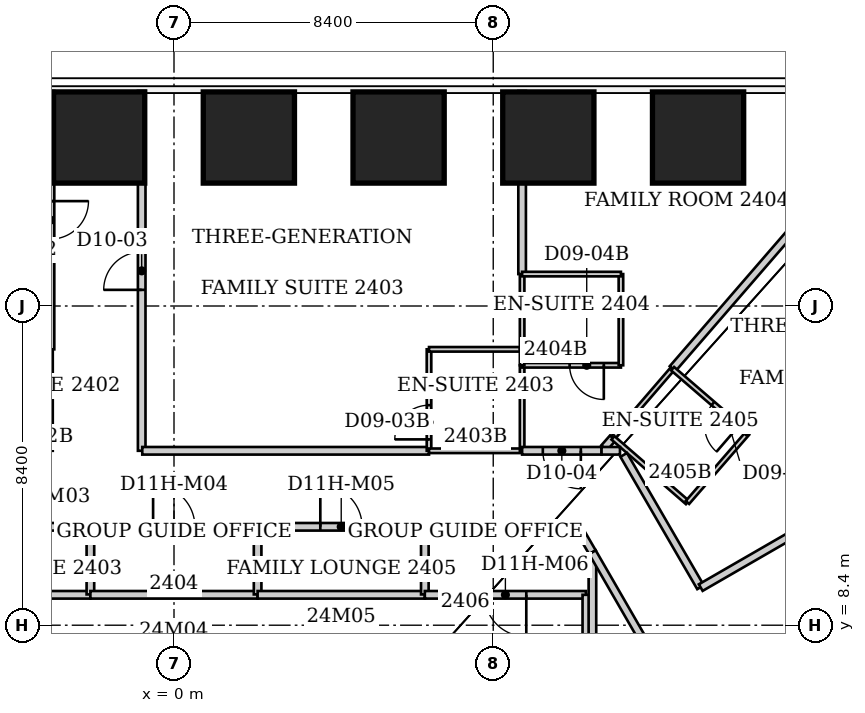
"""IFC4 building model, lengths in metres.
Left out: names, types, materials, properties, quantities, classifications, styles, units other than length and angle.
Written with IfcOpenShell. Run it as: python <this file> out.ifc"""

import sys

from ifc_helpers import new_model, si_unit, direction, frame, frame_2d, origin, origin_2d, place, context, subcontext, project, spatial, rectangle, extrude, element, fill, save


model = new_model("IFC4")
c1 = context("Model", 3, precision=1e-05, world=origin(), true_north=direction((0.0, 1.0)))
c2 = subcontext(c1, "Body", "Model", "MODEL_VIEW")
j1 = project(units=[si_unit("LENGTHUNIT", "METRE"), si_unit("PLANEANGLEUNIT", "RADIAN")], contexts=[c1])
p1 = place(None, origin())
s1 = spatial("IfcSite", under=j1, at=p1, CompositionType="ELEMENT")
p2 = place(p1, origin())
s2 = spatial("IfcBuilding", under=s1, at=p2, CompositionType="ELEMENT")
p3 = place(p2, frame((0.0, 0.0, 100.6)))
s3 = spatial("IfcBuildingStorey", under=s2, at=p3, CompositionType="ELEMENT", Elevation=100.6)
for number, where, z_axis, x_axis in (
    (1, (-1.97, 21.234, 0.0), (0.0, 0.0, 1.0), (0.0, 1.0, 0.0)),
    (2, (1.97, 21.234, 0.0), (0.0, 0.0, 1.0), (0.0, 1.0, 0.0)),
    (3, (5.91, 21.234, 0.0), (0.0, 0.0, 1.0), (0.0, 1.0, 0.0)),
    (4, (9.85, 21.234, 0.0), (0.0, 0.0, 1.0), (0.0, 1.0, 0.0)),
    (5, (13.79, 21.234, 0.0), (0.0, 0.0, 1.0), (0.0, 1.0, 0.0)),
):
    element("IfcColumn", number, at=place(p3, frame(where, z_axis=z_axis, x_axis=x_axis)), inside=s3, PredefinedType="COLUMN", context=c2, shape_type="SweptSolid", body=[
        extrude(rectangle(XDim=2.4, YDim=2.4, at=origin_2d()), origin(), (0.0, 0.0, 1.0), 3.8),
    ])
p4 = place(p3, frame((-6.6, 10.99, 0.0), z_axis=(0.0, 0.0, 1.0), x_axis=(1.0, 0.0, 0.0)))
e6 = element("IfcWall", 6, at=p4, inside=s3, PredefinedType="PARTITIONING", context=c2, shape_type="SweptSolid", body=[
    extrude(rectangle(XDim=4.4, YDim=0.2, at=frame_2d((2.2, 0.0))), origin(), (0.0, 0.0, 1.0), 3.64),
])
p5 = place(p4, frame((1.65, 0.0, 0.0)))
e7 = element("IfcOpeningElement", 7, at=p5, cuts=e6, PredefinedType="OPENING", context=c2, shape_type="SweptSolid", body=[
    extrude(rectangle(XDim=1.1, YDim=2.2, at=frame_2d((0.55, 1.1))), frame((0.0, 0.1, 0.0), z_axis=(0.0, -1.0, 0.0), x_axis=(1.0, 0.0, 0.0)), (0.0, 0.0, 1.0), 0.2),
])
p6 = place(p3, frame((-3.25, 15.66, 0.0), z_axis=(0.0, 0.0, 1.0), x_axis=(0.0, -1.0, 0.0)))
e8 = element("IfcWall", 8, at=p6, inside=s3, PredefinedType="PARTITIONING", context=c2, shape_type="SweptSolid", body=[
    extrude(rectangle(XDim=2.67, YDim=0.12, at=frame_2d((1.335, 0.0))), origin(), (0.0, 0.0, 1.0), 3.64),
])
p7 = place(p3, frame((-3.25, 22.46, 0.0), z_axis=(0.0, 0.0, 1.0), x_axis=(0.0, -1.0, 0.0)))
e9 = element("IfcWall", 9, at=p7, inside=s3, PredefinedType="PARTITIONING", context=c2, shape_type="SweptSolid", body=[
    extrude(rectangle(XDim=6.8, YDim=0.2, at=frame_2d((3.4, 0.0))), origin(), (0.0, 0.0, 1.0), 3.64),
])
p8 = place(p7, frame((2.9, 0.0, 0.0)))
e10 = element("IfcOpeningElement", 10, at=p8, cuts=e9, PredefinedType="OPENING", context=c2, shape_type="SweptSolid", body=[
    extrude(rectangle(XDim=1.0, YDim=2.13, at=frame_2d((0.5, 1.065))), frame((0.0, 0.1, 0.0), z_axis=(0.0, -1.0, 0.0), x_axis=(1.0, 0.0, 0.0)), (0.0, 0.0, 1.0), 0.2),
])
p9 = place(p3, frame((-2.2, 9.2, 0.0), z_axis=(0.0, 0.0, 1.0), x_axis=(-1.0, 0.0, 0.0)))
e11 = element("IfcWall", 11, at=p9, inside=s3, PredefinedType="PARTITIONING", context=c2, shape_type="SweptSolid", body=[
    extrude(rectangle(XDim=4.4, YDim=0.2, at=frame_2d((2.2, 0.0))), origin(), (0.0, 0.0, 1.0), 3.64),
])
p10 = place(p3, frame((-2.2, 10.98, 0.0), z_axis=(0.0, 0.0, 1.0), x_axis=(0.0, -1.0, 0.0)))
e12 = element("IfcWall", 12, at=p10, inside=s3, PredefinedType="PARTITIONING", context=c2, shape_type="SweptSolid", body=[
    extrude(rectangle(XDim=1.77, YDim=0.2, at=frame_2d((0.885, 0.0))), origin(), (0.0, 0.0, 1.0), 3.64),
])
p11 = place(p3, frame((-2.2, 10.99, 0.0), z_axis=(0.0, 0.0, 1.0), x_axis=(1.0, 0.0, 0.0)))
e13 = element("IfcWall", 13, at=p11, inside=s3, PredefinedType="PARTITIONING", context=c2, shape_type="SweptSolid", body=[
    extrude(rectangle(XDim=4.4, YDim=0.2, at=frame_2d((2.2, 0.0))), origin(), (0.0, 0.0, 1.0), 3.64),
])
p12 = place(p11, frame((1.65, 0.0, 0.0)))
e14 = element("IfcOpeningElement", 14, at=p12, cuts=e13, PredefinedType="OPENING", context=c2, shape_type="SweptSolid", body=[
    extrude(rectangle(XDim=1.1, YDim=2.2, at=frame_2d((0.55, 1.1))), frame((0.0, 0.1, 0.0), z_axis=(0.0, -1.0, 0.0), x_axis=(1.0, 0.0, 0.0)), (0.0, 0.0, 1.0), 0.2),
])
p13 = place(p3, frame((-0.85, 12.99, 0.0), z_axis=(0.0, 0.0, 1.0), x_axis=(0.0, 1.0, 0.0)))
e15 = element("IfcWall", 15, at=p13, inside=s3, PredefinedType="PARTITIONING", context=c2, shape_type="SweptSolid", body=[
    extrude(rectangle(XDim=9.47, YDim=0.2, at=frame_2d((4.735, 0.0))), origin(), (0.0, 0.0, 1.0), 3.64),
])
p14 = place(p13, frame((4.235, 0.0, 0.0)))
e16 = element("IfcOpeningElement", 16, at=p14, cuts=e15, PredefinedType="OPENING", context=c2, shape_type="SweptSolid", body=[
    extrude(rectangle(XDim=1.0, YDim=2.13, at=frame_2d((0.5, 1.065))), frame((0.0, 0.1, 0.0), z_axis=(0.0, -1.0, 0.0), x_axis=(1.0, 0.0, 0.0)), (0.0, 0.0, 1.0), 0.2),
])
p15 = place(p3, frame((2.2, 9.2, 0.0), z_axis=(0.0, 0.0, 1.0), x_axis=(-1.0, 0.0, 0.0)))
e17 = element("IfcWall", 17, at=p15, inside=s3, PredefinedType="PARTITIONING", context=c2, shape_type="SweptSolid", body=[
    extrude(rectangle(XDim=4.4, YDim=0.2, at=frame_2d((2.2, 0.0))), origin(), (0.0, 0.0, 1.0), 3.64),
])
p16 = place(p3, frame((2.2, 10.98, 0.0), z_axis=(0.0, 0.0, 1.0), x_axis=(0.0, -1.0, 0.0)))
e18 = element("IfcWall", 18, at=p16, inside=s3, PredefinedType="PARTITIONING", context=c2, shape_type="SweptSolid", body=[
    extrude(rectangle(XDim=1.77, YDim=0.2, at=frame_2d((0.885, 0.0))), origin(), (0.0, 0.0, 1.0), 3.64),
])
p17 = place(p3, frame((2.2, 10.99, 0.0), z_axis=(0.0, 0.0, 1.0), x_axis=(1.0, 0.0, 0.0)))
e19 = element("IfcWall", 19, at=p17, inside=s3, PredefinedType="PARTITIONING", context=c2, shape_type="SweptSolid", body=[
    extrude(rectangle(XDim=4.4, YDim=0.2, at=frame_2d((2.2, 0.0))), origin(), (0.0, 0.0, 1.0), 3.64),
])
p18 = place(p17, frame((1.65, 0.0, 0.0)))
e20 = element("IfcOpeningElement", 20, at=p18, cuts=e19, PredefinedType="OPENING", context=c2, shape_type="SweptSolid", body=[
    extrude(rectangle(XDim=1.1, YDim=2.2, at=frame_2d((0.55, 1.1))), frame((0.0, 0.1, 0.0), z_axis=(0.0, -1.0, 0.0), x_axis=(1.0, 0.0, 0.0)), (0.0, 0.0, 1.0), 0.2),
])
p19 = place(p3, frame((6.6, 9.2, 0.0), z_axis=(0.0, 0.0, 1.0), x_axis=(-1.0, 0.0, 0.0)))
e21 = element("IfcWall", 21, at=p19, inside=s3, PredefinedType="PARTITIONING", context=c2, shape_type="SweptSolid", body=[
    extrude(rectangle(XDim=4.4, YDim=0.2, at=frame_2d((2.2, 0.0))), origin(), (0.0, 0.0, 1.0), 3.64),
])
p20 = place(p3, frame((6.6, 10.98, 0.0), z_axis=(0.0, 0.0, 1.0), x_axis=(0.0, -1.0, 0.0)))
e22 = element("IfcWall", 22, at=p20, inside=s3, PredefinedType="PARTITIONING", context=c2, shape_type="SweptSolid", body=[
    extrude(rectangle(XDim=1.77, YDim=0.2, at=frame_2d((0.885, 0.0))), origin(), (0.0, 0.0, 1.0), 3.64),
])
p21 = place(p3, frame((6.6, 10.99, 0.0), z_axis=(0.0, 0.0, 1.0), x_axis=(1.0, 0.0, 0.0)))
e23 = element("IfcWall", 23, at=p21, inside=s3, PredefinedType="PARTITIONING", context=c2, shape_type="SweptSolid", body=[
    extrude(rectangle(XDim=4.02, YDim=0.2, at=frame_2d((2.01, 0.0))), origin(), (0.0, 0.0, 1.0), 3.64),
])
p22 = place(p3, frame((6.71, 12.99, 0.0), z_axis=(0.0, 0.0, 1.0), x_axis=(-1.0, 0.0, 0.0)))
e24 = element("IfcWall", 24, at=p22, inside=s3, PredefinedType="PARTITIONING", context=c2, shape_type="SweptSolid", body=[
    extrude(rectangle(XDim=7.545, YDim=0.2, at=frame_2d((3.772, 0.0))), origin(), (0.0, 0.0, 1.0), 3.64),
])
p23 = place(p3, frame((6.71, 15.66, 0.0), z_axis=(0.0, 0.0, 1.0), x_axis=(0.0, -1.0, 0.0)))
e25 = element("IfcWall", 25, at=p23, inside=s3, PredefinedType="PARTITIONING", context=c2, shape_type="SweptSolid", body=[
    extrude(rectangle(XDim=2.67, YDim=0.12, at=frame_2d((1.335, 0.0))), origin(), (0.0, 0.0, 1.0), 3.64),
])
p24 = place(p23, frame((1.47, 0.0, 0.0)))
e26 = element("IfcOpeningElement", 26, at=p24, cuts=e25, PredefinedType="OPENING", context=c2, shape_type="SweptSolid", body=[
    extrude(rectangle(XDim=0.9, YDim=2.03, at=frame_2d((0.45, 1.015))), frame((0.0, 0.06, 0.0), z_axis=(0.0, -1.0, 0.0), x_axis=(1.0, 0.0, 0.0)), (0.0, 0.0, 1.0), 0.12),
])
p25 = place(p3, frame((9.16, 12.99, 0.0), z_axis=(0.0, 0.0, 1.0), x_axis=(-1.0, 0.0, 0.0)))
e27 = element("IfcWall", 27, at=p25, inside=s3, PredefinedType="PARTITIONING", context=c2, shape_type="SweptSolid", body=[
    extrude(rectangle(XDim=2.45, YDim=0.12, at=frame_2d((1.225, 0.0))), origin(), (0.0, 0.0, 1.0), 3.64),
])
p26 = place(p3, frame((9.16, 15.24, 0.0), z_axis=(0.0, 0.0, 1.0), x_axis=(0.0, -1.0, 0.0)))
e28 = element("IfcWall", 28, at=p26, inside=s3, PredefinedType="PARTITIONING", context=c2, shape_type="SweptSolid", body=[
    extrude(rectangle(XDim=2.25, YDim=0.12, at=frame_2d((1.125, 0.0))), origin(), (0.0, 0.0, 1.0), 3.64),
])
p27 = place(p3, frame((9.16, 15.24, 0.0), z_axis=(0.0, 0.0, 1.0), x_axis=(1.0, 0.0, 0.0)))
e29 = element("IfcWall", 29, at=p27, inside=s3, PredefinedType="PARTITIONING", context=c2, shape_type="SweptSolid", body=[
    extrude(rectangle(XDim=2.6, YDim=0.12, at=frame_2d((1.3, 0.0))), origin(), (0.0, 0.0, 1.0), 3.64),
])
p28 = place(p27, frame((1.25, 0.0, 0.0)))
e30 = element("IfcOpeningElement", 30, at=p28, cuts=e29, PredefinedType="OPENING", context=c2, shape_type="SweptSolid", body=[
    extrude(rectangle(XDim=0.9, YDim=2.03, at=frame_2d((0.45, 1.015))), frame((0.0, 0.06, 0.0), z_axis=(0.0, -1.0, 0.0), x_axis=(1.0, 0.0, 0.0)), (0.0, 0.0, 1.0), 0.12),
])
p29 = place(p3, frame((9.16, 15.66, 0.0), z_axis=(0.0, 0.0, 1.0), x_axis=(-1.0, 0.0, 0.0)))
e31 = element("IfcWall", 31, at=p29, inside=s3, PredefinedType="PARTITIONING", context=c2, shape_type="SweptSolid", body=[
    extrude(rectangle(XDim=2.45, YDim=0.12, at=frame_2d((1.225, 0.0))), origin(), (0.0, 0.0, 1.0), 3.64),
])
p30 = place(p3, frame((9.16, 15.66, 0.0), z_axis=(0.0, 0.0, 1.0), x_axis=(0.0, -1.0, 0.0)))
e32 = element("IfcWall", 32, at=p30, inside=s3, PredefinedType="PARTITIONING", context=c2, shape_type="SweptSolid", body=[
    extrude(rectangle(XDim=0.42, YDim=0.12, at=frame_2d((0.21, 0.0))), origin(), (0.0, 0.0, 1.0), 3.64),
])
p31 = place(p3, frame((9.16, 17.64, 0.0), z_axis=(0.0, 0.0, 1.0), x_axis=(0.0, -1.0, 0.0)))
e33 = element("IfcWall", 33, at=p31, inside=s3, PredefinedType="PARTITIONING", context=c2, shape_type="SweptSolid", body=[
    extrude(rectangle(XDim=1.98, YDim=0.12, at=frame_2d((0.99, 0.0))), origin(), (0.0, 0.0, 1.0), 3.64),
])
p32 = place(p3, frame((9.16, 22.46, 0.0), z_axis=(0.0, 0.0, 1.0), x_axis=(0.0, -1.0, 0.0)))
e34 = element("IfcWall", 34, at=p32, inside=s3, PredefinedType="PARTITIONING", context=c2, shape_type="SweptSolid", body=[
    extrude(rectangle(XDim=4.82, YDim=0.2, at=frame_2d((2.41, 0.0))), origin(), (0.0, 0.0, 1.0), 3.64),
])
p33 = place(p3, frame((10.62, 10.99, 0.0), z_axis=(0.0, 0.0, 1.0), x_axis=(0.503009091795, -0.864281119527, 0.0)))
e35 = element("IfcWall", 35, at=p33, inside=s3, PredefinedType="PARTITIONING", context=c2, shape_type="SweptSolid", body=[
    extrude(rectangle(XDim=0.775, YDim=0.2, at=frame_2d((0.388, 0.0))), origin(), (0.0, 0.0, 1.0), 3.64),
])
p34 = place(p3, frame((10.84, 9.2, 0.0), z_axis=(0.0, 0.0, 1.0), x_axis=(-1.0, 0.0, 0.0)))
e36 = element("IfcWall", 36, at=p34, inside=s3, PredefinedType="PARTITIONING", context=c2, shape_type="SweptSolid", body=[
    extrude(rectangle(XDim=4.24, YDim=0.2, at=frame_2d((2.12, 0.0))), origin(), (0.0, 0.0, 1.0), 3.64),
])
p35 = place(p34, frame((1.57, 0.0, 0.0)))
e37 = element("IfcOpeningElement", 37, at=p35, cuts=e36, PredefinedType="OPENING", context=c2, shape_type="SweptSolid", body=[
    extrude(rectangle(XDim=1.1, YDim=2.2, at=frame_2d((0.55, 1.1))), frame((0.0, 0.1, 0.0), z_axis=(0.0, -1.0, 0.0), x_axis=(1.0, 0.0, 0.0)), (0.0, 0.0, 1.0), 0.2),
])
p36 = place(p3, frame((10.85, -4.91, 0.0), z_axis=(0.0, 0.0, 1.0), x_axis=(0.0, 1.0, 0.0)))
e38 = element("IfcWall", 38, at=p36, inside=s3, PredefinedType="PARTITIONING", context=c2, shape_type="SweptSolid", body=[
    extrude(rectangle(XDim=14.11, YDim=0.2, at=frame_2d((7.055, 0.0))), origin(), (0.0, 0.0, 1.0), 3.64),
])
p37 = place(p3, frame((11.01, 10.125, 0.0), z_axis=(0.0, 0.0, 1.0), x_axis=(0.0, -1.0, 0.0)))
e39 = element("IfcWall", 39, at=p37, inside=s3, PredefinedType="PARTITIONING", context=c2, shape_type="SweptSolid", body=[
    extrude(rectangle(XDim=14.855, YDim=0.2, at=frame_2d((7.427, 0.0))), origin(), (0.0, 0.0, 1.0), 3.64),
])
p38 = place(p3, frame((11.01, 10.32, 0.0), z_axis=(0.0, 0.0, 1.0), x_axis=(0.500036278648, -0.866004457284, 0.0)))
e40 = element("IfcWall", 40, at=p38, inside=s3, PredefinedType="PARTITIONING", context=c2, shape_type="SweptSolid", body=[
    extrude(rectangle(XDim=8.799, YDim=0.2, at=frame_2d((4.399, 0.0))), origin(), (0.0, 0.0, 1.0), 3.64),
])
p39 = place(p3, frame((11.25, 12.99, 0.0), z_axis=(0.0, 0.0, 1.0), x_axis=(-1.0, 0.0, 0.0)))
e41 = element("IfcWall", 41, at=p39, inside=s3, PredefinedType="PARTITIONING", context=c2, shape_type="SweptSolid", body=[
    extrude(rectangle(XDim=2.09, YDim=0.2, at=frame_2d((1.045, 0.0))), origin(), (0.0, 0.0, 1.0), 3.64),
])
p40 = place(p39, frame((0.545, 0.0, 0.0)))
e42 = element("IfcOpeningElement", 42, at=p40, cuts=e41, PredefinedType="OPENING", context=c2, shape_type="SweptSolid", body=[
    extrude(rectangle(XDim=1.0, YDim=2.13, at=frame_2d((0.5, 1.065))), frame((0.0, 0.1, 0.0), z_axis=(0.0, -1.0, 0.0), x_axis=(1.0, 0.0, 0.0)), (0.0, 0.0, 1.0), 0.2),
])
p41 = place(p3, frame((11.32, 13.069, 0.0), z_axis=(0.0, 0.0, 1.0), x_axis=(0.661575277995, 0.749878757897, 0.0)))
e43 = element("IfcWall", 43, at=p41, inside=s3, PredefinedType="PARTITIONING", context=c2, shape_type="SweptSolid", body=[
    extrude(rectangle(XDim=0.348, YDim=0.2, at=frame_2d((0.174, 0.0))), origin(), (0.0, 0.0, 1.0), 3.64),
])
p42 = place(p3, frame((11.55, 13.33, 0.0), z_axis=(0.0, 0.0, 1.0), x_axis=(0.653238965593, 0.75715180369, 0.0)))
e44 = element("IfcWall", 44, at=p42, inside=s3, PredefinedType="PARTITIONING", context=c2, shape_type="SweptSolid", body=[
    extrude(rectangle(XDim=2.404, YDim=0.12, at=frame_2d((1.202, 0.0))), origin(), (0.0, 0.0, 1.0), 3.64),
])
p43 = place(p3, frame((11.55, 13.33, 0.0), z_axis=(0.0, 0.0, 1.0), x_axis=(0.755437535555, -0.655220672655, 0.0)))
e45 = element("IfcWall", 45, at=p43, inside=s3, PredefinedType="PARTITIONING", context=c2, shape_type="SweptSolid", body=[
    extrude(rectangle(XDim=2.594, YDim=0.12, at=frame_2d((1.297, 0.0))), origin(), (0.0, 0.0, 1.0), 3.64),
])
p44 = place(p3, frame((11.735, 12.99, 0.0), z_axis=(0.0, 0.0, 1.0), x_axis=(-1.0, 0.0, 0.0)))
e46 = element("IfcWall", 46, at=p44, inside=s3, PredefinedType="PARTITIONING", context=c2, shape_type="SweptSolid", body=[
    extrude(rectangle(XDim=0.485, YDim=0.2, at=frame_2d((0.243, 0.0))), origin(), (0.0, 0.0, 1.0), 3.64),
])
p45 = place(p3, frame((11.76, 15.24, 0.0), z_axis=(0.0, 0.0, 1.0), x_axis=(0.0, 1.0, 0.0)))
e47 = element("IfcWall", 47, at=p45, inside=s3, PredefinedType="PARTITIONING", context=c2, shape_type="SweptSolid", body=[
    extrude(rectangle(XDim=2.4, YDim=0.12, at=frame_2d((1.2, 0.0))), origin(), (0.0, 0.0, 1.0), 3.038),
])
p46 = place(p3, frame((11.76, 17.64, 0.0), z_axis=(0.0, 0.0, 1.0), x_axis=(-1.0, 0.0, 0.0)))
e48 = element("IfcWall", 48, at=p46, inside=s3, PredefinedType="PARTITIONING", context=c2, shape_type="SweptSolid", body=[
    extrude(rectangle(XDim=2.6, YDim=0.12, at=frame_2d((1.3, 0.0))), origin(), (0.0, 0.0, 1.0), 3.64),
])
p47 = place(p3, frame((13.12, 15.15, 0.0), z_axis=(0.0, 0.0, 1.0), x_axis=(0.654515490482, 0.756048591507, 0.0)))
e49 = element("IfcWall", 49, at=p47, inside=s3, PredefinedType="PARTITIONING", context=c2, shape_type="SweptSolid", body=[
    extrude(rectangle(XDim=9.229, YDim=0.2, at=frame_2d((4.614, 0.0))), origin(), (0.0, 0.0, 1.0), 3.64),
])
p48 = place(p3, frame((13.51, 11.63, 0.0), z_axis=(0.0, 0.0, 1.0), x_axis=(0.655566599468, 0.75513736079, 0.0)))
e50 = element("IfcWall", 50, at=p48, inside=s3, PredefinedType="PARTITIONING", context=c2, shape_type="SweptSolid", body=[
    extrude(rectangle(XDim=2.41, YDim=0.12, at=frame_2d((1.205, 0.0))), origin(), (0.0, 0.0, 1.0), 3.64),
])
p49 = place(p3, frame((13.855, 9.399, 0.0), z_axis=(0.0, 0.0, 1.0), x_axis=(-0.502087259191, 0.864816965698, 0.0)))
e51 = element("IfcWall", 51, at=p49, inside=s3, PredefinedType="PARTITIONING", context=c2, shape_type="SweptSolid", body=[
    extrude(rectangle(XDim=4.028, YDim=0.2, at=frame_2d((2.014, 0.0))), origin(), (0.0, 0.0, 1.0), 3.64),
])
p50 = place(p3, frame((15.06, 7.31, 0.0), z_axis=(0.0, 0.0, 1.0), x_axis=(0.866042039906, 0.499971184285, 0.0)))
e52 = element("IfcWall", 52, at=p50, inside=s3, PredefinedType="PARTITIONING", context=c2, shape_type="SweptSolid", body=[
    extrude(rectangle(XDim=11.47, YDim=0.2, at=frame_2d((5.735, 0.0))), origin(), (0.0, 0.0, 1.0), 3.64),
])
p51 = place(p50, frame((5.235, 0.0, 0.0)))
e53 = element("IfcOpeningElement", 53, at=p51, cuts=e52, PredefinedType="OPENING", context=c2, shape_type="SweptSolid", body=[
    extrude(rectangle(XDim=1.0, YDim=2.13, at=frame_2d((0.5, 1.065))), frame((0.0, 0.1, 0.0), z_axis=(0.0, -1.0, 0.0), x_axis=(1.0, 0.0, 0.0)), (0.0, 0.0, 1.0), 0.2),
])
p52 = place(p3, frame((15.09, 13.45, 0.0), z_axis=(0.0, 0.0, 1.0), x_axis=(-0.757086659925, 0.653314464377, 0.0)))
e54 = element("IfcWall", 54, at=p52, inside=s3, PredefinedType="PARTITIONING", context=c2, shape_type="SweptSolid", body=[
    extrude(rectangle(XDim=2.602, YDim=0.12, at=frame_2d((1.301, 0.0))), origin(), (0.0, 0.0, 1.0), 3.64),
])
p53 = place(p52, frame((0.3, 0.0, 0.0)))
e55 = element("IfcOpeningElement", 55, at=p53, cuts=e54, PredefinedType="OPENING", context=c2, shape_type="SweptSolid", body=[
    extrude(rectangle(XDim=0.9, YDim=2.03, at=frame_2d((0.45, 1.015))), frame((0.0, 0.06, 0.0), z_axis=(0.0, -1.0, 0.0), x_axis=(1.0, 0.0, 0.0)), (0.0, 0.0, 1.0), 0.12),
])
p54 = place(p3, frame((23.794, 15.125, 0.0), z_axis=(0.0, 0.0, 1.0), x_axis=(-0.866032823784, -0.499987147964, 0.0)))
e56 = element("IfcWall", 56, at=p54, inside=s3, PredefinedType="PARTITIONING", context=c2, shape_type="SweptSolid", body=[
    extrude(rectangle(XDim=11.47, YDim=0.2, at=frame_2d((5.735, 0.0))), origin(), (0.0, 0.0, 1.0), 3.64),
])
p55 = place(p54, frame((5.235, 0.0, 0.0)))
e57 = element("IfcOpeningElement", 57, at=p55, cuts=e56, PredefinedType="OPENING", context=c2, shape_type="SweptSolid", body=[
    extrude(rectangle(XDim=1.0, YDim=2.13, at=frame_2d((0.5, 1.065))), frame((0.0, 0.1, 0.0), z_axis=(0.0, -1.0, 0.0), x_axis=(1.0, 0.0, 0.0)), (0.0, 0.0, 1.0), 0.2),
])
p56 = place(p14, origin())
e58 = element("IfcDoor", 58, at=p56, inside=s3, OperationType="SINGLE_SWING_LEFT", PredefinedType="DOOR", context=c2, shape_type="SweptSolid", body=[
    extrude(rectangle(XDim=1.0, YDim=2.13, at=frame_2d((0.5, 1.065))), frame((0.0, 0.025, 0.0), z_axis=(0.0, -1.0, 0.0), x_axis=(1.0, 0.0, 0.0)), (0.0, 0.0, 1.0), 0.05),
])
fill(e16, e58)
p57 = place(p24, origin())
e59 = element("IfcDoor", 59, at=p57, inside=s3, OperationType="SINGLE_SWING_RIGHT", PredefinedType="DOOR", context=c2, shape_type="SweptSolid", body=[
    extrude(rectangle(XDim=0.9, YDim=2.03, at=frame_2d((0.45, 1.015))), frame((0.0, 0.025, 0.0), z_axis=(0.0, -1.0, 0.0), x_axis=(1.0, 0.0, 0.0)), (0.0, 0.0, 1.0), 0.05),
])
fill(e26, e59)
p58 = place(p40, origin())
e60 = element("IfcDoor", 60, at=p58, inside=s3, OperationType="SINGLE_SWING_LEFT", PredefinedType="DOOR", context=c2, shape_type="SweptSolid", body=[
    extrude(rectangle(XDim=1.0, YDim=2.13, at=frame_2d((0.5, 1.065))), frame((0.0, 0.025, 0.0), z_axis=(0.0, -1.0, 0.0), x_axis=(1.0, 0.0, 0.0)), (0.0, 0.0, 1.0), 0.05),
])
fill(e42, e60)
p59 = place(p28, origin())
e61 = element("IfcDoor", 61, at=p59, inside=s3, OperationType="SINGLE_SWING_RIGHT", PredefinedType="DOOR", context=c2, shape_type="SweptSolid", body=[
    extrude(rectangle(XDim=0.9, YDim=2.03, at=frame_2d((0.45, 1.015))), frame((0.0, 0.025, 0.0), z_axis=(0.0, -1.0, 0.0), x_axis=(1.0, 0.0, 0.0)), (0.0, 0.0, 1.0), 0.05),
])
fill(e30, e61)
p60 = place(p53, origin())
e62 = element("IfcDoor", 62, at=p60, inside=s3, OperationType="SINGLE_SWING_LEFT", PredefinedType="DOOR", context=c2, shape_type="SweptSolid", body=[
    extrude(rectangle(XDim=0.9, YDim=2.03, at=frame_2d((0.45, 1.015))), frame((0.0, 0.025, 0.0), z_axis=(0.0, -1.0, 0.0), x_axis=(1.0, 0.0, 0.0)), (0.0, 0.0, 1.0), 0.05),
])
fill(e55, e62)
p61 = place(p12, origin())
e63 = element("IfcDoor", 63, at=p61, inside=s3, OperationType="SINGLE_SWING_LEFT", PredefinedType="DOOR", context=c2, shape_type="SweptSolid", body=[
    extrude(rectangle(XDim=1.1, YDim=2.2, at=frame_2d((0.55, 1.1))), frame((0.0, 0.025, 0.0), z_axis=(0.0, -1.0, 0.0), x_axis=(1.0, 0.0, 0.0)), (0.0, 0.0, 1.0), 0.05),
])
fill(e14, e63)
p62 = place(p18, origin())
e64 = element("IfcDoor", 64, at=p62, inside=s3, OperationType="SINGLE_SWING_LEFT", PredefinedType="DOOR", context=c2, shape_type="SweptSolid", body=[
    extrude(rectangle(XDim=1.1, YDim=2.2, at=frame_2d((0.55, 1.1))), frame((0.0, 0.025, 0.0), z_axis=(0.0, -1.0, 0.0), x_axis=(1.0, 0.0, 0.0)), (0.0, 0.0, 1.0), 0.05),
])
fill(e20, e64)
p63 = place(p35, origin())
e65 = element("IfcDoor", 65, at=p63, inside=s3, OperationType="SINGLE_SWING_LEFT", PredefinedType="DOOR", context=c2, shape_type="SweptSolid", body=[
    extrude(rectangle(XDim=1.1, YDim=2.2, at=frame_2d((0.55, 1.1))), frame((0.0, 0.025, 0.0), z_axis=(0.0, -1.0, 0.0), x_axis=(1.0, 0.0, 0.0)), (0.0, 0.0, 1.0), 0.05),
])
fill(e37, e65)
save(model, sys.argv[1])
